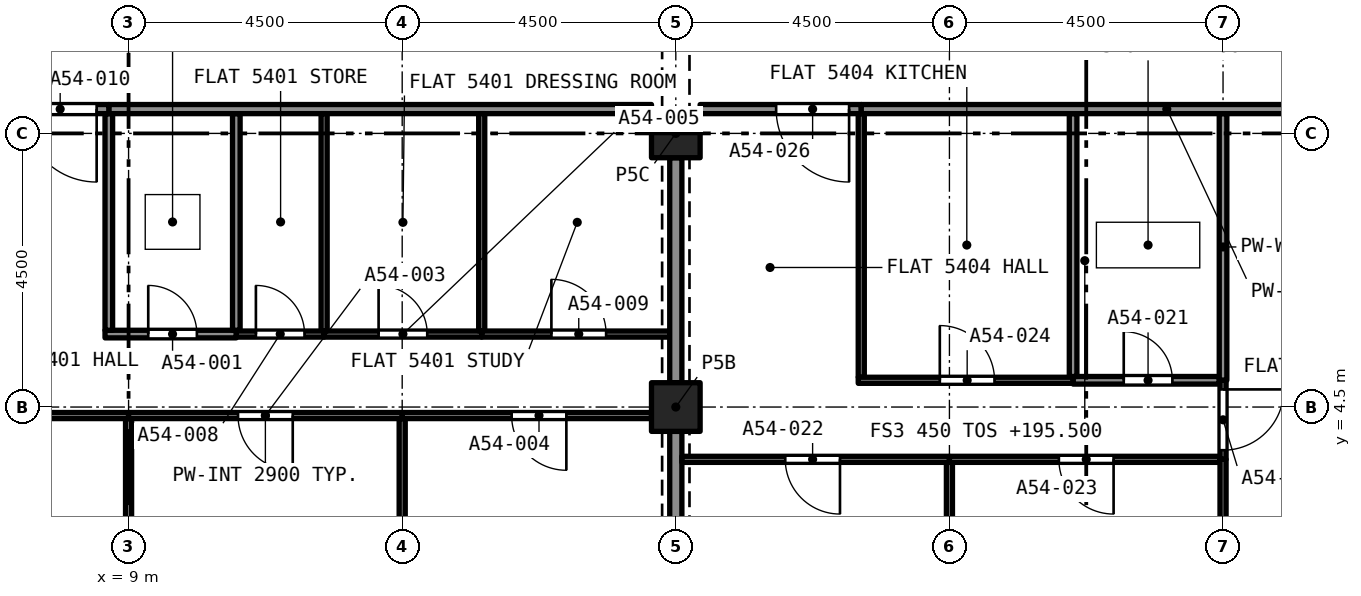
"""IFC4 building model, lengths in metres.
Left out: names, types, materials, properties, quantities, classifications, styles, units other than length and angle.
Written with IfcOpenShell. Run it as: python <this file> out.ifc"""

import sys

from ifc_helpers import new_model, si_unit, direction, frame, frame_2d, origin, origin_2d, place, context, subcontext, project, spatial, rectangle, extrude, element, fill, save


model = new_model("IFC4")
c1 = context("Model", 3, precision=1e-05, world=origin(), true_north=direction((0.0, 1.0)))
c2 = subcontext(c1, "Body", "Model", "MODEL_VIEW")
j1 = project(units=[si_unit("LENGTHUNIT", "METRE"), si_unit("PLANEANGLEUNIT", "RADIAN")], contexts=[c1])
p1 = place(None, origin())
s1 = spatial("IfcSite", under=j1, at=p1, CompositionType="ELEMENT")
p2 = place(p1, origin())
s2 = spatial("IfcBuilding", under=s1, at=p2, CompositionType="ELEMENT")
p3 = place(p2, frame((0.0, 0.0, 195.5)))
s3 = spatial("IfcBuildingStorey", under=s2, at=p3, CompositionType="ELEMENT", Elevation=195.5)
for number, where, z_axis, x_axis in (
    (1, (18.0, 4.5, 0.0), (0.0, 0.0, 1.0), (1.0, 0.0, 0.0)),
    (2, (18.0, 9.0, 0.0), (0.0, 0.0, 1.0), (1.0, 0.0, 0.0)),
):
    element("IfcColumn", number, at=place(p3, frame(where, z_axis=z_axis, x_axis=x_axis)), inside=s3, PredefinedType="COLUMN", context=c2, shape_type="SweptSolid", body=[
        extrude(rectangle(XDim=0.8, YDim=0.8, at=origin_2d()), origin(), (0.0, 0.0, 1.0), 3.2),
    ])
p4 = place(p3, frame((8.613, 5.7, 0.0), z_axis=(0.0, 0.0, 1.0), x_axis=(1.0, 0.0, 0.0)))
e3 = element("IfcWall", 3, at=p4, inside=s3, PredefinedType="PARTITIONING", context=c2, shape_type="SweptSolid", body=[
    extrude(rectangle(XDim=2.159, YDim=0.125, at=frame_2d((1.08, 0.0))), origin(), (0.0, 0.0, 1.0), 2.9),
])
p5 = place(p4, frame((0.711, 0.0, 0.0)))
e4 = element("IfcOpeningElement", 4, at=p5, cuts=e3, PredefinedType="OPENING", context=c2, shape_type="SweptSolid", body=[
    extrude(rectangle(XDim=0.8, YDim=2.1, at=frame_2d((0.4, 1.05))), frame((0.0, 0.073, 0.0), z_axis=(0.0, -1.0, 0.0), x_axis=(1.0, 0.0, 0.0)), (0.0, 0.0, 1.0), 0.145),
])
for number, where, z_axis, x_axis in (
    (5, (8.675, 5.762, 0.0), (0.0, 0.0, 1.0), (0.0, 1.0, 0.0)),
    (6, (10.772, 5.762, 0.0), (0.0, 0.0, 1.0), (0.0, 1.0, 0.0)),
):
    element("IfcWall", number, at=place(p3, frame(where, z_axis=z_axis, x_axis=x_axis)), inside=s3, PredefinedType="PARTITIONING", context=c2, shape_type="SweptSolid", body=[
        extrude(rectangle(XDim=3.562, YDim=0.125, at=frame_2d((1.781, 0.0))), origin(), (0.0, 0.0, 1.0), 2.9),
    ])
p6 = place(p3, frame((8.675, 9.4, 0.0), z_axis=(0.0, 0.0, 1.0), x_axis=(1.0, 0.0, 0.0)))
e7 = element("IfcWall", 7, at=p6, inside=s3, PredefinedType="PARTITIONING", context=c2, shape_type="SweptSolid", body=[
    extrude(rectangle(XDim=8.925, YDim=0.15, at=frame_2d((4.462, 0.0))), origin(), (0.0, 0.0, 1.0), 2.9),
])
p7 = place(p3, frame((9.0, 0.4, 0.0), z_axis=(0.0, 0.0, 1.0), x_axis=(0.0, 1.0, 0.0)))
e8 = element("IfcWall", 8, at=p7, inside=s3, PredefinedType="PARTITIONING", context=c2, shape_type="SweptSolid", body=[
    extrude(rectangle(XDim=3.91, YDim=0.1, at=frame_2d((1.955, 0.0))), origin(), (0.0, 0.0, 1.0), 2.9),
])
p8 = place(p3, frame((9.0, 4.36, 0.0), z_axis=(0.0, 0.0, 1.0), x_axis=(-1.0, 0.0, 0.0)))
e9 = element("IfcWall", 9, at=p8, inside=s3, PredefinedType="PARTITIONING", context=c2, shape_type="SweptSolid", body=[
    extrude(rectangle(XDim=4.45, YDim=0.1, at=frame_2d((2.225, 0.0))), origin(), (0.0, 0.0, 1.0), 2.9),
])
p9 = place(p8, frame((1.8, 0.0, 0.0)))
e10 = element("IfcOpeningElement", 10, at=p9, cuts=e9, PredefinedType="OPENING", context=c2, shape_type="SweptSolid", body=[
    extrude(rectangle(XDim=0.9, YDim=2.1, at=frame_2d((0.45, 1.05))), frame((0.0, 0.06, 0.0), z_axis=(0.0, -1.0, 0.0), x_axis=(1.0, 0.0, 0.0)), (0.0, 0.0, 1.0), 0.12),
])
p10 = place(p3, frame((13.5, 0.4, 0.0), z_axis=(0.0, 0.0, 1.0), x_axis=(0.0, 1.0, 0.0)))
e11 = element("IfcWall", 11, at=p10, inside=s3, PredefinedType="PARTITIONING", context=c2, shape_type="SweptSolid", body=[
    extrude(rectangle(XDim=3.91, YDim=0.1, at=frame_2d((1.955, 0.0))), origin(), (0.0, 0.0, 1.0), 2.9),
])
p11 = place(p3, frame((13.5, 4.36, 0.0), z_axis=(0.0, 0.0, 1.0), x_axis=(-1.0, 0.0, 0.0)))
e12 = element("IfcWall", 12, at=p11, inside=s3, PredefinedType="PARTITIONING", context=c2, shape_type="SweptSolid", body=[
    extrude(rectangle(XDim=4.5, YDim=0.1, at=frame_2d((2.25, 0.0))), origin(), (0.0, 0.0, 1.0), 2.9),
])
p12 = place(p11, frame((1.8, 0.0, 0.0)))
e13 = element("IfcOpeningElement", 13, at=p12, cuts=e12, PredefinedType="OPENING", context=c2, shape_type="SweptSolid", body=[
    extrude(rectangle(XDim=0.9, YDim=2.1, at=frame_2d((0.45, 1.05))), frame((0.0, 0.06, 0.0), z_axis=(0.0, -1.0, 0.0), x_axis=(1.0, 0.0, 0.0)), (0.0, 0.0, 1.0), 0.12),
])
p13 = place(p3, frame((17.6, 4.36, 0.0), z_axis=(0.0, 0.0, 1.0), x_axis=(-1.0, 0.0, 0.0)))
e14 = element("IfcWall", 14, at=p13, inside=s3, PredefinedType="PARTITIONING", context=c2, shape_type="SweptSolid", body=[
    extrude(rectangle(XDim=4.1, YDim=0.1, at=frame_2d((2.05, 0.0))), origin(), (0.0, 0.0, 1.0), 2.9),
])
p14 = place(p13, frame((1.4, 0.0, 0.0)))
e15 = element("IfcOpeningElement", 15, at=p14, cuts=e14, PredefinedType="OPENING", context=c2, shape_type="SweptSolid", body=[
    extrude(rectangle(XDim=0.9, YDim=2.1, at=frame_2d((0.45, 1.05))), frame((0.0, 0.06, 0.0), z_axis=(0.0, -1.0, 0.0), x_axis=(1.0, 0.0, 0.0)), (0.0, 0.0, 1.0), 0.12),
])
p15 = place(p3, frame((18.0, 0.4, 0.0), z_axis=(0.0, 0.0, 1.0), x_axis=(0.0, 1.0, 0.0)))
e16 = element("IfcWall", 16, at=p15, inside=s3, PredefinedType="PARTITIONING", context=c2, shape_type="SweptSolid", body=[
    extrude(rectangle(XDim=3.7, YDim=0.2, at=frame_2d((1.85, 0.0))), origin(), (0.0, 0.0, 1.0), 2.38),
])
p16 = place(p3, frame((12.216, 5.7, 0.0), z_axis=(0.0, 0.0, 1.0), x_axis=(1.0, 0.0, 0.0)))
e17 = element("IfcWall", 17, at=p16, inside=s3, PredefinedType="PARTITIONING", context=c2, shape_type="SweptSolid", body=[
    extrude(rectangle(XDim=2.591, YDim=0.1, at=frame_2d((1.296, 0.0))), origin(), (0.0, 0.0, 1.0), 2.9),
])
p17 = place(p16, frame((0.896, 0.0, 0.0)))
e18 = element("IfcOpeningElement", 18, at=p17, cuts=e17, PredefinedType="OPENING", context=c2, shape_type="SweptSolid", body=[
    extrude(rectangle(XDim=0.8, YDim=2.1, at=frame_2d((0.4, 1.05))), frame((0.0, 0.06, 0.0), z_axis=(0.0, -1.0, 0.0), x_axis=(1.0, 0.0, 0.0)), (0.0, 0.0, 1.0), 0.12),
])
for number, where, z_axis, x_axis in (
    (19, (12.216, 5.75, 0.0), (0.0, 0.0, 1.0), (0.0, 1.0, 0.0)),
    (20, (14.808, 5.75, 0.0), (0.0, 0.0, 1.0), (0.0, 1.0, 0.0)),
):
    element("IfcWall", number, at=place(p3, frame(where, z_axis=z_axis, x_axis=x_axis)), inside=s3, PredefinedType="PARTITIONING", context=c2, shape_type="SweptSolid", body=[
        extrude(rectangle(XDim=3.575, YDim=0.1, at=frame_2d((1.788, 0.0))), origin(), (0.0, 0.0, 1.0), 2.9),
    ])
p18 = place(p3, frame((10.772, 5.7, 0.0), z_axis=(0.0, 0.0, 1.0), x_axis=(1.0, 0.0, 0.0)))
e21 = element("IfcWall", 21, at=p18, inside=s3, PredefinedType="PARTITIONING", context=c2, shape_type="SweptSolid", body=[
    extrude(rectangle(XDim=1.445, YDim=0.1, at=frame_2d((0.722, 0.0))), origin(), (0.0, 0.0, 1.0), 2.9),
])
p19 = place(p18, frame((0.322, 0.0, 0.0)))
e22 = element("IfcOpeningElement", 22, at=p19, cuts=e21, PredefinedType="OPENING", context=c2, shape_type="SweptSolid", body=[
    extrude(rectangle(XDim=0.8, YDim=2.1, at=frame_2d((0.4, 1.05))), frame((0.0, 0.06, 0.0), z_axis=(0.0, -1.0, 0.0), x_axis=(1.0, 0.0, 0.0)), (0.0, 0.0, 1.0), 0.12),
])
p20 = place(p3, frame((14.808, 5.7, 0.0), z_axis=(0.0, 0.0, 1.0), x_axis=(1.0, 0.0, 0.0)))
e23 = element("IfcWall", 23, at=p20, inside=s3, PredefinedType="PARTITIONING", context=c2, shape_type="SweptSolid", body=[
    extrude(rectangle(XDim=3.092, YDim=0.1, at=frame_2d((1.546, 0.0))), origin(), (0.0, 0.0, 1.0), 2.9),
])
p21 = place(p20, frame((1.146, 0.0, 0.0)))
e24 = element("IfcOpeningElement", 24, at=p21, cuts=e23, PredefinedType="OPENING", context=c2, shape_type="SweptSolid", body=[
    extrude(rectangle(XDim=0.9, YDim=2.1, at=frame_2d((0.45, 1.05))), frame((0.0, 0.06, 0.0), z_axis=(0.0, -1.0, 0.0), x_axis=(1.0, 0.0, 0.0)), (0.0, 0.0, 1.0), 0.12),
])
p22 = place(p3, frame((18.0, 4.9, 0.0), z_axis=(0.0, 0.0, 1.0), x_axis=(0.0, 1.0, 0.0)))
e25 = element("IfcWall", 25, at=p22, inside=s3, PredefinedType="PARTITIONING", context=c2, shape_type="SweptSolid", body=[
    extrude(rectangle(XDim=3.7, YDim=0.2, at=frame_2d((1.85, 0.0))), origin(), (0.0, 0.0, 1.0), 2.38),
])
p23 = place(p3, frame((8.675, 9.4, 0.0), z_axis=(0.0, 0.0, 1.0), x_axis=(-1.0, 0.0, 0.0)))
e26 = element("IfcWall", 26, at=p23, inside=s3, PredefinedType="PARTITIONING", context=c2, shape_type="SweptSolid", body=[
    extrude(rectangle(XDim=1.6, YDim=0.15, at=frame_2d((0.8, 0.0))), origin(), (0.0, 0.0, 1.0), 2.9),
])
p24 = place(p23, frame((0.2, 0.0, 0.0)))
e27 = element("IfcOpeningElement", 27, at=p24, cuts=e26, PredefinedType="OPENING", context=c2, shape_type="SweptSolid", body=[
    extrude(rectangle(XDim=1.2, YDim=2.4, at=frame_2d((0.6, 1.2))), frame((0.0, 0.085, 0.0), z_axis=(0.0, -1.0, 0.0), x_axis=(1.0, 0.0, 0.0)), (0.0, 0.0, 1.0), 0.17),
])
p25 = place(p3, frame((24.534, 4.94, 0.0), z_axis=(0.0, 0.0, 1.0), x_axis=(1.0, 0.0, 0.0)))
e28 = element("IfcWall", 28, at=p25, inside=s3, PredefinedType="PARTITIONING", context=c2, shape_type="SweptSolid", body=[
    extrude(rectangle(XDim=2.404, YDim=0.125, at=frame_2d((1.202, 0.0))), origin(), (0.0, 0.0, 1.0), 2.75),
])
p26 = place(p25, frame((0.833, 0.0, 0.0)))
e29 = element("IfcOpeningElement", 29, at=p26, cuts=e28, PredefinedType="OPENING", context=c2, shape_type="SweptSolid", body=[
    extrude(rectangle(XDim=0.8, YDim=2.1, at=frame_2d((0.4, 1.05))), frame((0.0, 0.073, 0.0), z_axis=(0.0, -1.0, 0.0), x_axis=(1.0, 0.0, 0.0)), (0.0, 0.0, 1.0), 0.145),
])
p27 = place(p3, frame((24.534, 5.002, 0.0), z_axis=(0.0, 0.0, 1.0), x_axis=(0.0, 1.0, 0.0)))
e30 = element("IfcWall", 30, at=p27, inside=s3, PredefinedType="PARTITIONING", context=c2, shape_type="SweptSolid", body=[
    extrude(rectangle(XDim=4.323, YDim=0.125, at=frame_2d((2.161, 0.0))), origin(), (0.0, 0.0, 1.0), 2.75),
])
p28 = place(p3, frame((27.0, 4.94, 0.0), z_axis=(0.0, 0.0, 1.0), x_axis=(0.0, 1.0, 0.0)))
e31 = element("IfcWall", 31, at=p28, inside=s3, PredefinedType="PARTITIONING", context=c2, shape_type="SweptSolid", body=[
    extrude(rectangle(XDim=4.385, YDim=0.125, at=frame_2d((2.192, 0.0))), origin(), (0.0, 0.0, 1.0), 2.75),
])
p29 = place(p3, frame((22.5, 0.4, 0.0), z_axis=(0.0, 0.0, 1.0), x_axis=(0.0, 1.0, 0.0)))
e32 = element("IfcWall", 32, at=p29, inside=s3, PredefinedType="PARTITIONING", context=c2, shape_type="SweptSolid", body=[
    extrude(rectangle(XDim=3.19, YDim=0.1, at=frame_2d((1.595, 0.0))), origin(), (0.0, 0.0, 1.0), 2.75),
])
p30 = place(p3, frame((22.5, 3.64, 0.0), z_axis=(0.0, 0.0, 1.0), x_axis=(-1.0, 0.0, 0.0)))
e33 = element("IfcWall", 33, at=p30, inside=s3, PredefinedType="PARTITIONING", context=c2, shape_type="SweptSolid", body=[
    extrude(rectangle(XDim=4.4, YDim=0.1, at=frame_2d((2.2, 0.0))), origin(), (0.0, 0.0, 1.0), 2.75),
])
p31 = place(p30, frame((1.8, 0.0, 0.0)))
e34 = element("IfcOpeningElement", 34, at=p31, cuts=e33, PredefinedType="OPENING", context=c2, shape_type="SweptSolid", body=[
    extrude(rectangle(XDim=0.9, YDim=2.1, at=frame_2d((0.45, 1.05))), frame((0.0, 0.06, 0.0), z_axis=(0.0, -1.0, 0.0), x_axis=(1.0, 0.0, 0.0)), (0.0, 0.0, 1.0), 0.12),
])
p32 = place(p3, frame((26.95, 3.64, 0.0), z_axis=(0.0, 0.0, 1.0), x_axis=(-1.0, 0.0, 0.0)))
e35 = element("IfcWall", 35, at=p32, inside=s3, PredefinedType="PARTITIONING", context=c2, shape_type="SweptSolid", body=[
    extrude(rectangle(XDim=4.45, YDim=0.1, at=frame_2d((2.225, 0.0))), origin(), (0.0, 0.0, 1.0), 2.75),
])
p33 = place(p32, frame((1.75, 0.0, 0.0)))
e36 = element("IfcOpeningElement", 36, at=p33, cuts=e35, PredefinedType="OPENING", context=c2, shape_type="SweptSolid", body=[
    extrude(rectangle(XDim=0.9, YDim=2.1, at=frame_2d((0.45, 1.05))), frame((0.0, 0.06, 0.0), z_axis=(0.0, -1.0, 0.0), x_axis=(1.0, 0.0, 0.0)), (0.0, 0.0, 1.0), 0.12),
])
p34 = place(p3, frame((27.0, 0.433, 0.0), z_axis=(0.0, 0.0, 1.0), x_axis=(0.0, 1.0, 0.0)))
e37 = element("IfcWall", 37, at=p34, inside=s3, PredefinedType="PARTITIONING", context=c2, shape_type="SweptSolid", body=[
    extrude(rectangle(XDim=3.207, YDim=0.1, at=frame_2d((1.604, 0.0))), origin(), (0.0, 0.0, 1.0), 2.75),
])
p35 = place(p3, frame((21.05, 4.99, 0.0), z_axis=(0.0, 0.0, 1.0), x_axis=(0.0, 1.0, 0.0)))
e38 = element("IfcWall", 38, at=p35, inside=s3, PredefinedType="PARTITIONING", context=c2, shape_type="SweptSolid", body=[
    extrude(rectangle(XDim=4.335, YDim=0.1, at=frame_2d((2.167, 0.0))), origin(), (0.0, 0.0, 1.0), 2.75),
])
p36 = place(p3, frame((21.0, 4.94, 0.0), z_axis=(0.0, 0.0, 1.0), x_axis=(1.0, 0.0, 0.0)))
e39 = element("IfcWall", 39, at=p36, inside=s3, PredefinedType="PARTITIONING", context=c2, shape_type="SweptSolid", body=[
    extrude(rectangle(XDim=3.534, YDim=0.1, at=frame_2d((1.767, 0.0))), origin(), (0.0, 0.0, 1.0), 2.75),
])
p37 = place(p36, frame((1.342, 0.0, 0.0)))
e40 = element("IfcOpeningElement", 40, at=p37, cuts=e39, PredefinedType="OPENING", context=c2, shape_type="SweptSolid", body=[
    extrude(rectangle(XDim=0.9, YDim=2.1, at=frame_2d((0.45, 1.05))), frame((0.0, 0.06, 0.0), z_axis=(0.0, -1.0, 0.0), x_axis=(1.0, 0.0, 0.0)), (0.0, 0.0, 1.0), 0.12),
])
p38 = place(p3, frame((27.0, 4.94, 0.0), z_axis=(0.0, 0.0, 1.0), x_axis=(0.0, -1.0, 0.0)))
e41 = element("IfcWall", 41, at=p38, inside=s3, PredefinedType="PARTITIONING", context=c2, shape_type="SweptSolid", body=[
    extrude(rectangle(XDim=1.3, YDim=0.1, at=frame_2d((0.65, 0.0))), origin(), (0.0, 0.0, 1.0), 2.75),
])
p39 = place(p38, frame((0.15, 0.0, 0.0)))
e42 = element("IfcOpeningElement", 42, at=p39, cuts=e41, PredefinedType="OPENING", context=c2, shape_type="SweptSolid", body=[
    extrude(rectangle(XDim=1.0, YDim=2.1, at=frame_2d((0.5, 1.05))), frame((0.0, 0.06, 0.0), z_axis=(0.0, -1.0, 0.0), x_axis=(1.0, 0.0, 0.0)), (0.0, 0.0, 1.0), 0.12),
])
p40 = place(p3, frame((21.05, 9.4, 0.0), z_axis=(0.0, 0.0, 1.0), x_axis=(-1.0, 0.0, 0.0)))
e43 = element("IfcWall", 43, at=p40, inside=s3, PredefinedType="PARTITIONING", context=c2, shape_type="SweptSolid", body=[
    extrude(rectangle(XDim=2.65, YDim=0.15, at=frame_2d((1.325, 0.0))), origin(), (0.0, 0.0, 1.0), 2.75),
])
p41 = place(p40, frame((0.2, 0.0, 0.0)))
e44 = element("IfcOpeningElement", 44, at=p41, cuts=e43, PredefinedType="OPENING", context=c2, shape_type="SweptSolid", body=[
    extrude(rectangle(XDim=1.2, YDim=2.4, at=frame_2d((0.6, 1.2))), frame((0.0, 0.085, 0.0), z_axis=(0.0, -1.0, 0.0), x_axis=(1.0, 0.0, 0.0)), (0.0, 0.0, 1.0), 0.17),
])
p42 = place(p3, frame((21.05, 9.4, 0.0), z_axis=(0.0, 0.0, 1.0), x_axis=(1.0, 0.0, 0.0)))
e45 = element("IfcWall", 45, at=p42, inside=s3, PredefinedType="PARTITIONING", context=c2, shape_type="SweptSolid", body=[
    extrude(rectangle(XDim=10.05, YDim=0.15, at=frame_2d((5.025, 0.0))), origin(), (0.0, 0.0, 1.0), 2.75),
])
p43 = place(p5, origin())
e46 = element("IfcDoor", 46, at=p43, inside=s3, OperationType="SINGLE_SWING_RIGHT", PredefinedType="DOOR", context=c2, shape_type="SweptSolid", body=[
    extrude(rectangle(XDim=0.8, YDim=2.1, at=frame_2d((0.4, 1.05))), frame((0.0, 0.025, 0.0), z_axis=(0.0, -1.0, 0.0), x_axis=(1.0, 0.0, 0.0)), (0.0, 0.0, 1.0), 0.05),
])
fill(e4, e46)
p44 = place(p12, origin())
e47 = element("IfcDoor", 47, at=p44, inside=s3, OperationType="SINGLE_SWING_LEFT", PredefinedType="DOOR", context=c2, shape_type="SweptSolid", body=[
    extrude(rectangle(XDim=0.9, YDim=2.1, at=frame_2d((0.45, 1.05))), frame((0.0, 0.025, 0.0), z_axis=(0.0, -1.0, 0.0), x_axis=(1.0, 0.0, 0.0)), (0.0, 0.0, 1.0), 0.05),
])
fill(e13, e47)
p45 = place(p14, origin())
e48 = element("IfcDoor", 48, at=p45, inside=s3, OperationType="SINGLE_SWING_LEFT", PredefinedType="DOOR", context=c2, shape_type="SweptSolid", body=[
    extrude(rectangle(XDim=0.9, YDim=2.1, at=frame_2d((0.45, 1.05))), frame((0.0, 0.025, 0.0), z_axis=(0.0, -1.0, 0.0), x_axis=(1.0, 0.0, 0.0)), (0.0, 0.0, 1.0), 0.05),
])
fill(e15, e48)
p46 = place(p17, origin())
e49 = element("IfcDoor", 49, at=p46, inside=s3, OperationType="SINGLE_SWING_LEFT", PredefinedType="DOOR", context=c2, shape_type="SweptSolid", body=[
    extrude(rectangle(XDim=0.8, YDim=2.1, at=frame_2d((0.4, 1.05))), frame((0.0, 0.025, 0.0), z_axis=(0.0, -1.0, 0.0), x_axis=(1.0, 0.0, 0.0)), (0.0, 0.0, 1.0), 0.05),
])
fill(e18, e49)
p47 = place(p19, origin())
e50 = element("IfcDoor", 50, at=p47, inside=s3, OperationType="SINGLE_SWING_RIGHT", PredefinedType="DOOR", context=c2, shape_type="SweptSolid", body=[
    extrude(rectangle(XDim=0.8, YDim=2.1, at=frame_2d((0.4, 1.05))), frame((0.0, 0.025, 0.0), z_axis=(0.0, -1.0, 0.0), x_axis=(1.0, 0.0, 0.0)), (0.0, 0.0, 1.0), 0.05),
])
fill(e22, e50)
p48 = place(p21, origin())
e51 = element("IfcDoor", 51, at=p48, inside=s3, OperationType="SINGLE_SWING_RIGHT", PredefinedType="DOOR", context=c2, shape_type="SweptSolid", body=[
    extrude(rectangle(XDim=0.9, YDim=2.1, at=frame_2d((0.45, 1.05))), frame((0.0, 0.025, 0.0), z_axis=(0.0, -1.0, 0.0), x_axis=(1.0, 0.0, 0.0)), (0.0, 0.0, 1.0), 0.05),
])
fill(e24, e51)
p49 = place(p24, origin())
e52 = element("IfcDoor", 52, at=p49, inside=s3, OperationType="SINGLE_SWING_RIGHT", PredefinedType="DOOR", context=c2, shape_type="SweptSolid", body=[
    extrude(rectangle(XDim=1.2, YDim=2.4, at=frame_2d((0.6, 1.2))), frame((0.0, 0.025, 0.0), z_axis=(0.0, -1.0, 0.0), x_axis=(1.0, 0.0, 0.0)), (0.0, 0.0, 1.0), 0.05),
])
fill(e27, e52)
p50 = place(p26, origin())
e53 = element("IfcDoor", 53, at=p50, inside=s3, OperationType="SINGLE_SWING_RIGHT", PredefinedType="DOOR", context=c2, shape_type="SweptSolid", body=[
    extrude(rectangle(XDim=0.8, YDim=2.1, at=frame_2d((0.4, 1.05))), frame((0.0, 0.025, 0.0), z_axis=(0.0, -1.0, 0.0), x_axis=(1.0, 0.0, 0.0)), (0.0, 0.0, 1.0), 0.05),
])
fill(e29, e53)
p51 = place(p31, origin())
e54 = element("IfcDoor", 54, at=p51, inside=s3, OperationType="SINGLE_SWING_RIGHT", PredefinedType="DOOR", context=c2, shape_type="SweptSolid", body=[
    extrude(rectangle(XDim=0.9, YDim=2.1, at=frame_2d((0.45, 1.05))), frame((0.0, 0.025, 0.0), z_axis=(0.0, -1.0, 0.0), x_axis=(1.0, 0.0, 0.0)), (0.0, 0.0, 1.0), 0.05),
])
fill(e34, e54)
p52 = place(p33, origin())
e55 = element("IfcDoor", 55, at=p52, inside=s3, OperationType="SINGLE_SWING_LEFT", PredefinedType="DOOR", context=c2, shape_type="SweptSolid", body=[
    extrude(rectangle(XDim=0.9, YDim=2.1, at=frame_2d((0.45, 1.05))), frame((0.0, 0.025, 0.0), z_axis=(0.0, -1.0, 0.0), x_axis=(1.0, 0.0, 0.0)), (0.0, 0.0, 1.0), 0.05),
])
fill(e36, e55)
p53 = place(p37, origin())
e56 = element("IfcDoor", 56, at=p53, inside=s3, OperationType="SINGLE_SWING_RIGHT", PredefinedType="DOOR", context=c2, shape_type="SweptSolid", body=[
    extrude(rectangle(XDim=0.9, YDim=2.1, at=frame_2d((0.45, 1.05))), frame((0.0, 0.025, 0.0), z_axis=(0.0, -1.0, 0.0), x_axis=(1.0, 0.0, 0.0)), (0.0, 0.0, 1.0), 0.05),
])
fill(e40, e56)
p54 = place(p39, origin())
e57 = element("IfcDoor", 57, at=p54, inside=s3, OperationType="SINGLE_SWING_RIGHT", PredefinedType="DOOR", context=c2, shape_type="SweptSolid", body=[
    extrude(rectangle(XDim=1.0, YDim=2.1, at=frame_2d((0.5, 1.05))), frame((0.0, 0.025, 0.0), z_axis=(0.0, -1.0, 0.0), x_axis=(1.0, 0.0, 0.0)), (0.0, 0.0, 1.0), 0.05),
])
fill(e42, e57)
p55 = place(p41, origin())
e58 = element("IfcDoor", 58, at=p55, inside=s3, OperationType="SINGLE_SWING_LEFT", PredefinedType="DOOR", context=c2, shape_type="SweptSolid", body=[
    extrude(rectangle(XDim=1.2, YDim=2.4, at=frame_2d((0.6, 1.2))), frame((0.0, 0.025, 0.0), z_axis=(0.0, -1.0, 0.0), x_axis=(1.0, 0.0, 0.0)), (0.0, 0.0, 1.0), 0.05),
])
fill(e44, e58)
save(model, sys.argv[1])
